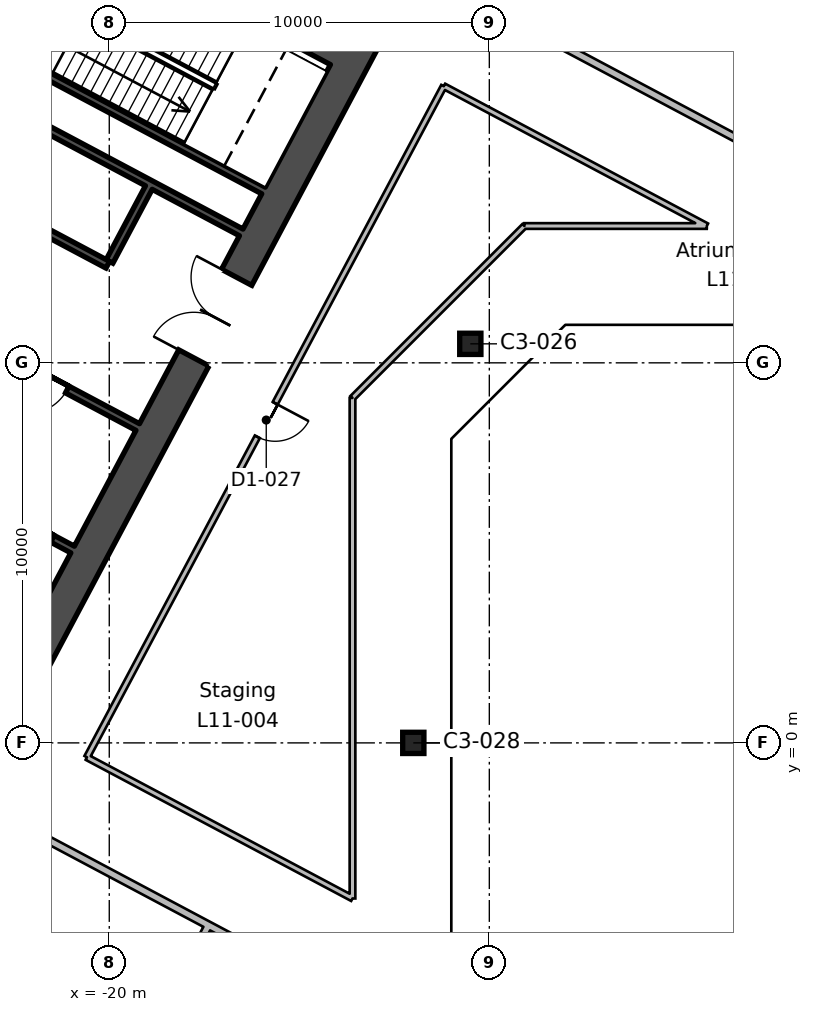
"""IFC4 building model, lengths in metres.
Left out: names, types, materials, properties, quantities, classifications, styles, units other than length and angle.
Written with IfcOpenShell. Run it as: python <this file> out.ifc"""

import sys

from ifc_helpers import new_model, si_unit, direction, frame, frame_2d, origin, origin_2d, place, context, subcontext, project, spatial, rectangle, hollow_rectangle, extrude, element, fill, save


model = new_model("IFC4")
c1 = context("Model", 3, precision=1e-05, world=origin(), true_north=direction((0.0, 1.0)))
c2 = subcontext(c1, "Body", "Model", "MODEL_VIEW")
j1 = project(units=[si_unit("LENGTHUNIT", "METRE"), si_unit("PLANEANGLEUNIT", "RADIAN")], contexts=[c1])
p1 = place(None, origin())
s1 = spatial("IfcSite", under=j1, at=p1, CompositionType="ELEMENT")
p2 = place(p1, origin())
s2 = spatial("IfcBuilding", under=s1, at=p2, CompositionType="ELEMENT")
p3 = place(p2, frame((0.0, 0.0, 60.8)))
s3 = spatial("IfcBuildingStorey", under=s2, at=p3, CompositionType="ELEMENT", Elevation=60.8)
for number, where, z_axis, x_axis in (
    (1, (-12.0, 0.0, 0.0), (0.0, 0.0, 1.0), (1.0, 0.0, 0.0)),
    (2, (-10.5, 10.5, 0.0), (0.0, 0.0, 1.0), (1.0, 0.0, 0.0)),
):
    element("IfcColumn", number, at=place(p3, frame(where, z_axis=z_axis, x_axis=x_axis)), inside=s3, PredefinedType="COLUMN", context=c2, shape_type="SweptSolid", body=[
        extrude(hollow_rectangle(XDim=0.559, YDim=0.559, WallThickness=0.024, InnerFilletRadius=0.012, OuterFilletRadius=0.035, at=origin_2d()), origin(), (0.0, 0.0, 1.0), 5.4),
    ])
p4 = place(p3, frame((-13.362, 18.43, 0.0), z_axis=(0.0, 0.0, 1.0), x_axis=(-0.46947084998, -0.882947971864, 0.0)))
e3 = element("IfcWall", 3, at=p4, inside=s3, PredefinedType="SHEAR", context=c2, shape_type="SweptSolid", body=[
    extrude(rectangle(XDim=20.0, YDim=0.9, at=frame_2d((10.0, 0.0))), origin(), (0.0, 0.0, 1.0), 5.4),
])
p5 = place(p4, frame((7.0, 0.0, 0.0)))
e4 = element("IfcOpeningElement", 4, at=p5, cuts=e3, PredefinedType="OPENING", context=c2, shape_type="SweptSolid", body=[
    extrude(rectangle(XDim=2.4, YDim=2.4, at=frame_2d((1.2, 1.2))), frame((0.0, 0.46, 0.0), z_axis=(0.0, -1.0, 0.0), x_axis=(1.0, 0.0, 0.0)), (0.0, 0.0, 1.0), 0.92),
])
p6 = place(p3, frame((-13.97, 18.244, 0.0), z_axis=(0.0, 0.0, 1.0), x_axis=(-0.88294509198, 0.469476266226, 0.0)))
e5 = element("IfcWall", 5, at=p6, inside=s3, PredefinedType="SHEAR", context=c2, shape_type="SweptSolid", body=[
    extrude(rectangle(XDim=20.2, YDim=0.9, at=frame_2d((10.1, 0.0))), origin(), (0.0, 0.0, 1.0), 5.4),
])
p7 = place(p3, frame((-18.96, 14.611, 0.0), z_axis=(0.0, 0.0, 1.0), x_axis=(-0.4694473164, -0.882960484464, 0.0)))
e6 = element("IfcWall", 6, at=p7, inside=s3, PredefinedType="SHEAR", context=c2, shape_type="SweptSolid", body=[
    extrude(rectangle(XDim=2.2, YDim=0.2, at=frame_2d((1.1, 0.0))), origin(), (0.0, 0.0, 1.0), 5.4),
])
p8 = place(p3, frame((-21.333, 21.649, 0.0), z_axis=(0.0, 0.0, 1.0), x_axis=(-0.469494272526, -0.882935517501, 0.0)))
e7 = element("IfcWall", 7, at=p8, inside=s3, PredefinedType="SHEAR", context=c2, shape_type="SweptSolid", body=[
    extrude(rectangle(XDim=7.3, YDim=0.2, at=frame_2d((3.65, 0.0))), origin(), (0.0, 0.0, 1.0), 5.4),
])
p9 = place(p8, frame((1.3, 0.0, 0.0)))
e8 = element("IfcOpeningElement", 8, at=p9, cuts=e7, PredefinedType="OPENING", context=c2, shape_type="SweptSolid", body=[
    extrude(rectangle(XDim=1.2, YDim=2.1, at=frame_2d((0.6, 1.05))), frame((0.0, 0.11, 0.0), z_axis=(0.0, -1.0, 0.0), x_axis=(1.0, 0.0, 0.0)), (0.0, 0.0, 1.0), 0.22),
])
p10 = place(p3, frame((-15.942, 14.536, 0.0), z_axis=(0.0, 0.0, 1.0), x_axis=(-0.882946947542, 0.469472776449, 0.0)))
e9 = element("IfcWall", 9, at=p10, inside=s3, PredefinedType="SHEAR", context=c2, shape_type="SweptSolid", body=[
    extrude(rectangle(XDim=8.0, YDim=0.2, at=frame_2d((4.0, 0.0))), origin(), (0.0, 0.0, 1.0), 5.4),
])
p11 = place(p3, frame((-16.529, 13.432, 0.0), z_axis=(0.0, 0.0, 1.0), x_axis=(-0.88295287151, 0.469461634952, 0.0)))
e10 = element("IfcWall", 10, at=p11, inside=s3, PredefinedType="SHEAR", context=c2, shape_type="SweptSolid", body=[
    extrude(rectangle(XDim=8.0, YDim=0.2, at=frame_2d((4.0, 0.0))), origin(), (0.0, 0.0, 1.0), 5.4),
])
p12 = place(p3, frame((-20.04, 12.581, 0.0), z_axis=(0.0, 0.0, 1.0), x_axis=(-0.882942972946, 0.469480251476, 0.0)))
e11 = element("IfcWall", 11, at=p12, inside=s3, PredefinedType="SHEAR", context=c2, shape_type="SweptSolid", body=[
    extrude(rectangle(XDim=5.4, YDim=0.2, at=frame_2d((2.7, 0.0))), origin(), (0.0, 0.0, 1.0), 5.4),
])
p13 = place(p12, frame((2.25, 0.0, 0.0)))
e12 = element("IfcOpeningElement", 12, at=p13, cuts=e11, PredefinedType="OPENING", context=c2, shape_type="SweptSolid", body=[
    extrude(rectangle(XDim=0.9, YDim=2.1, at=frame_2d((0.45, 1.05))), frame((0.0, 0.11, 0.0), z_axis=(0.0, -1.0, 0.0), x_axis=(1.0, 0.0, 0.0)), (0.0, 0.0, 1.0), 0.22),
])
p14 = place(p3, frame((-19.252, 8.311, 0.0), z_axis=(0.0, 0.0, 1.0), x_axis=(-0.882955722218, 0.469456273365, 0.0)))
e13 = element("IfcWall", 13, at=p14, inside=s3, PredefinedType="SHEAR", context=c2, shape_type="SweptSolid", body=[
    extrude(rectangle(XDim=10.0, YDim=0.2, at=frame_2d((5.0, 0.0))), origin(), (0.0, 0.0, 1.0), 5.4),
])
p15 = place(p14, frame((2.1, 0.0, 0.0)))
e14 = element("IfcOpeningElement", 14, at=p15, cuts=e13, PredefinedType="OPENING", context=c2, shape_type="SweptSolid", body=[
    extrude(rectangle(XDim=1.2, YDim=2.1, at=frame_2d((0.6, 1.05))), frame((0.0, 0.11, 0.0), z_axis=(0.0, -1.0, 0.0), x_axis=(1.0, 0.0, 0.0)), (0.0, 0.0, 1.0), 0.22),
])
p16 = place(p3, frame((-20.965, 5.088, 0.0), z_axis=(0.0, 0.0, 1.0), x_axis=(-0.882925986334, 0.469512196493, 0.0)))
e15 = element("IfcWall", 15, at=p16, inside=s3, PredefinedType="SHEAR", context=c2, shape_type="SweptSolid", body=[
    extrude(rectangle(XDim=4.5, YDim=0.2, at=frame_2d((2.25, 0.0))), origin(), (0.0, 0.0, 1.0), 5.4),
])
p17 = place(p16, frame((0.6, 0.0, 0.0)))
e16 = element("IfcOpeningElement", 16, at=p17, cuts=e15, PredefinedType="OPENING", context=c2, shape_type="SweptSolid", body=[
    extrude(rectangle(XDim=1.1, YDim=2.1, at=frame_2d((0.55, 1.05))), frame((0.0, 0.11, 0.0), z_axis=(0.0, -1.0, 0.0), x_axis=(1.0, 0.0, 0.0)), (0.0, 0.0, 1.0), 0.22),
])
p18 = place(p3, frame((-48.541, 39.854, 0.0), z_axis=(0.0, 0.0, 1.0), x_axis=(0.882945008423, -0.469476423372, 0.0)))
e17 = element("IfcWall", 17, at=p18, inside=s3, PredefinedType="PARTITIONING", context=c2, shape_type="SweptSolid", body=[
    extrude(rectangle(XDim=54.976, YDim=0.2, at=frame_2d((27.488, 0.0))), origin(), (0.0, 0.0, 1.0), 5.0),
])
p19 = place(p18, frame((27.965, 0.0, 0.0)))
e18 = element("IfcOpeningElement", 18, at=p19, cuts=e17, PredefinedType="OPENING", context=c2, shape_type="SweptSolid", body=[
    extrude(rectangle(XDim=1.0, YDim=2.1, at=frame_2d((0.5, 1.05))), frame((0.0, 0.11, 0.0), z_axis=(0.0, -1.0, 0.0), x_axis=(1.0, 0.0, 0.0)), (0.0, 0.0, 1.0), 0.22),
])
p20 = place(p18, frame((26.265, 0.0, 0.0)))
e19 = element("IfcOpeningElement", 19, at=p20, cuts=e17, PredefinedType="OPENING", context=c2, shape_type="SweptSolid", body=[
    extrude(rectangle(XDim=1.0, YDim=2.1, at=frame_2d((0.5, 1.05))), frame((0.0, 0.11, 0.0), z_axis=(0.0, -1.0, 0.0), x_axis=(1.0, 0.0, 0.0)), (0.0, 0.0, 1.0), 0.22),
])
p21 = place(p18, frame((15.365, 0.0, 0.0)))
e20 = element("IfcOpeningElement", 20, at=p21, cuts=e17, PredefinedType="OPENING", context=c2, shape_type="SweptSolid", body=[
    extrude(rectangle(XDim=1.0, YDim=2.1, at=frame_2d((0.5, 1.05))), frame((0.0, 0.11, 0.0), z_axis=(0.0, -1.0, 0.0), x_axis=(1.0, 0.0, 0.0)), (0.0, 0.0, 1.0), 0.22),
])
p22 = place(p3, frame((-13.6, -6.813, 0.0), z_axis=(0.0, 0.0, 1.0), x_axis=(-0.882934546757, 0.469496098113, 0.0)))
e21 = element("IfcWall", 21, at=p22, inside=s3, PredefinedType="PARTITIONING", context=c2, shape_type="SweptSolid", body=[
    extrude(rectangle(XDim=36.758, YDim=0.2, at=frame_2d((18.379, 0.0))), origin(), (0.0, 0.0, 1.0), 5.0),
])
p23 = place(p22, frame((20.35, 0.0, 0.0)))
e22 = element("IfcOpeningElement", 22, at=p23, cuts=e21, PredefinedType="OPENING", context=c2, shape_type="SweptSolid", body=[
    extrude(rectangle(XDim=1.0, YDim=2.1, at=frame_2d((0.5, 1.05))), frame((0.0, 0.11, 0.0), z_axis=(0.0, -1.0, 0.0), x_axis=(1.0, 0.0, 0.0)), (0.0, 0.0, 1.0), 0.22),
])
p24 = place(p22, frame((17.85, 0.0, 0.0)))
e23 = element("IfcOpeningElement", 23, at=p24, cuts=e21, PredefinedType="OPENING", context=c2, shape_type="SweptSolid", body=[
    extrude(rectangle(XDim=1.0, YDim=2.1, at=frame_2d((0.5, 1.05))), frame((0.0, 0.11, 0.0), z_axis=(0.0, -1.0, 0.0), x_axis=(1.0, 0.0, 0.0)), (0.0, 0.0, 1.0), 0.22),
])
p25 = place(p3, frame((-17.388, -4.798, 0.0), z_axis=(0.0, 0.0, 1.0), x_axis=(-0.469532456729, -0.882915212281, 0.0)))
e24 = element("IfcWall", 24, at=p25, inside=s3, PredefinedType="PARTITIONING", context=c2, shape_type="SweptSolid", body=[
    extrude(rectangle(XDim=8.8, YDim=0.2, at=frame_2d((4.4, 0.0))), origin(), (0.0, 0.0, 1.0), 5.0),
])
p26 = place(p3, frame((-20.588, -0.379, 0.0), z_axis=(0.0, 0.0, 1.0), x_axis=(0.469489882812, 0.882937851685, 0.0)))
e25 = element("IfcWall", 25, at=p26, inside=s3, PredefinedType="PARTITIONING", context=c2, shape_type="SweptSolid", body=[
    extrude(rectangle(XDim=20.0, YDim=0.15, at=frame_2d((10.0, 0.0))), origin(), (0.0, 0.0, 1.0), 5.0),
])
p27 = place(p26, frame((9.55, 0.0, 0.0)))
e26 = element("IfcOpeningElement", 26, at=p27, cuts=e25, PredefinedType="OPENING", context=c2, shape_type="SweptSolid", body=[
    extrude(rectangle(XDim=1.0, YDim=2.1, at=frame_2d((0.5, 1.05))), frame((0.0, 0.085, 0.0), z_axis=(0.0, -1.0, 0.0), x_axis=(1.0, 0.0, 0.0)), (0.0, 0.0, 1.0), 0.17),
])
p28 = place(p3, frame((-11.198, 17.28, 0.0), z_axis=(0.0, 0.0, 1.0), x_axis=(0.882946288452, -0.46947401601, 0.0)))
e27 = element("IfcWall", 27, at=p28, inside=s3, PredefinedType="PARTITIONING", context=c2, shape_type="SweptSolid", body=[
    extrude(rectangle(XDim=7.838, YDim=0.15, at=frame_2d((3.919, 0.0))), origin(), (0.0, 0.0, 1.0), 5.0),
])
p29 = place(p3, frame((-4.277, 13.6, 0.0), z_axis=(0.0, 0.0, 1.0), x_axis=(-1.0, 0.0, 0.0)))
e28 = element("IfcWall", 28, at=p29, inside=s3, PredefinedType="PARTITIONING", context=c2, shape_type="SweptSolid", body=[
    extrude(rectangle(XDim=4.8, YDim=0.15, at=frame_2d((2.4, 0.0))), origin(), (0.0, 0.0, 1.0), 5.0),
])
p30 = place(p3, frame((-9.077, 13.6, 0.0), z_axis=(0.0, 0.0, 1.0), x_axis=(-0.707106781187, -0.707106781187, 0.0)))
e29 = element("IfcWall", 29, at=p30, inside=s3, PredefinedType="PARTITIONING", context=c2, shape_type="SweptSolid", body=[
    extrude(rectangle(XDim=6.397, YDim=0.15, at=frame_2d((3.198, 0.0))), origin(), (0.0, 0.0, 1.0), 5.0),
])
p31 = place(p3, frame((-13.6, 9.077, 0.0), z_axis=(0.0, 0.0, 1.0), x_axis=(0.0, -1.0, 0.0)))
e30 = element("IfcWall", 30, at=p31, inside=s3, PredefinedType="PARTITIONING", context=c2, shape_type="SweptSolid", body=[
    extrude(rectangle(XDim=13.171, YDim=0.15, at=frame_2d((6.585, 0.0))), origin(), (0.0, 0.0, 1.0), 5.0),
])
p32 = place(p3, frame((-13.6, -4.094, 0.0), z_axis=(0.0, 0.0, 1.0), x_axis=(-0.882967890474, 0.469433386533, 0.0)))
e31 = element("IfcWall", 31, at=p32, inside=s3, PredefinedType="PARTITIONING", context=c2, shape_type="SweptSolid", body=[
    extrude(rectangle(XDim=7.914, YDim=0.15, at=frame_2d((3.957, 0.0))), origin(), (0.0, 0.0, 1.0), 5.0),
])
p33 = place(p5, frame((2.4, 0.0, 0.0), z_axis=(0.0, 0.0, 1.0), x_axis=(-1.0, 0.0, 0.0)))
e32 = element("IfcDoor", 32, at=p33, inside=s3, OperationType="DOUBLE_DOOR_SINGLE_SWING", PredefinedType="DOOR", context=c2, shape_type="SweptSolid", body=[
    extrude(rectangle(XDim=2.4, YDim=2.4, at=frame_2d((1.2, 1.2))), frame((0.0, 0.025, 0.0), z_axis=(0.0, -1.0, 0.0), x_axis=(1.0, 0.0, 0.0)), (0.0, 0.0, 1.0), 0.05),
])
fill(e4, e32)
p34 = place(p15, origin())
e33 = element("IfcDoor", 33, at=p34, inside=s3, OperationType="SINGLE_SWING_RIGHT", PredefinedType="DOOR", context=c2, shape_type="SweptSolid", body=[
    extrude(rectangle(XDim=1.2, YDim=2.1, at=frame_2d((0.6, 1.05))), frame((0.0, 0.025, 0.0), z_axis=(0.0, -1.0, 0.0), x_axis=(1.0, 0.0, 0.0)), (0.0, 0.0, 1.0), 0.05),
])
fill(e14, e33)
p35 = place(p17, origin())
e34 = element("IfcDoor", 34, at=p35, inside=s3, OperationType="DOUBLE_DOOR_SLIDING", PredefinedType="DOOR", context=c2, shape_type="SweptSolid", body=[
    extrude(rectangle(XDim=1.1, YDim=2.1, at=frame_2d((0.55, 1.05))), frame((0.0, 0.025, 0.0), z_axis=(0.0, -1.0, 0.0), x_axis=(1.0, 0.0, 0.0)), (0.0, 0.0, 1.0), 0.05),
])
fill(e16, e34)
p36 = place(p27, frame((1.0, 0.0, 0.0), z_axis=(0.0, 0.0, 1.0), x_axis=(-1.0, 0.0, 0.0)))
e35 = element("IfcDoor", 35, at=p36, inside=s3, OperationType="SINGLE_SWING_LEFT", PredefinedType="DOOR", context=c2, shape_type="SweptSolid", body=[
    extrude(rectangle(XDim=1.0, YDim=2.1, at=frame_2d((0.5, 1.05))), frame((0.0, 0.025, 0.0), z_axis=(0.0, -1.0, 0.0), x_axis=(1.0, 0.0, 0.0)), (0.0, 0.0, 1.0), 0.05),
])
fill(e26, e35)
save(model, sys.argv[1])
